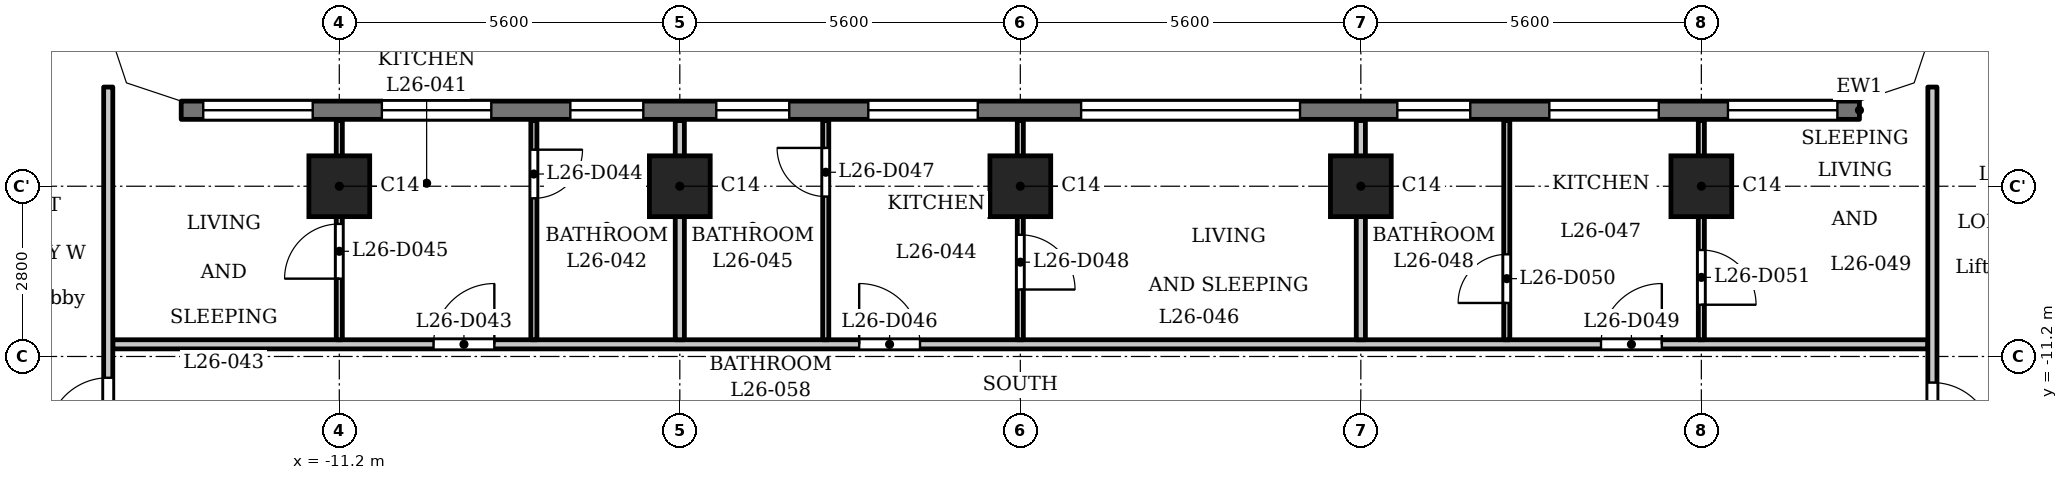
"""IFC4 building model, lengths in metres.
Left out: names, types, materials, properties, quantities, classifications, styles, units other than length and angle.
Written with IfcOpenShell. Run it as: python <this file> out.ifc"""

import sys

from ifc_helpers import new_model, si_unit, direction, frame, frame_2d, origin, origin_2d, place, context, subcontext, project, spatial, polyline, rectangle, outline, extrude, element, fill, save


model = new_model("IFC4")
c1 = context("Model", 3, precision=1e-05, world=origin(), true_north=direction((0.0, 1.0)))
c2 = subcontext(c1, "Body", "Model", "MODEL_VIEW")
j1 = project(units=[si_unit("LENGTHUNIT", "METRE"), si_unit("PLANEANGLEUNIT", "RADIAN")], contexts=[c1])
p1 = place(None, origin())
s1 = spatial("IfcSite", under=j1, at=p1, CompositionType="ELEMENT")
p2 = place(p1, origin())
s2 = spatial("IfcBuilding", under=s1, at=p2, CompositionType="ELEMENT")
p3 = place(p2, frame((0.0, 0.0, 104.3)))
s3 = spatial("IfcBuildingStorey", under=s2, at=p3, CompositionType="ELEMENT", Elevation=104.3)
for number, where, z_axis, x_axis in (
    (1, (-11.2, -8.4, 0.0), (0.0, 0.0, 1.0), (1.0, 0.0, 0.0)),
    (2, (-5.6, -8.4, 0.0), (0.0, 0.0, 1.0), (1.0, 0.0, 0.0)),
    (3, (0.0, -8.4, 0.0), (0.0, 0.0, 1.0), (1.0, 0.0, 0.0)),
    (4, (5.6, -8.4, 0.0), (0.0, 0.0, 1.0), (1.0, 0.0, 0.0)),
    (5, (11.2, -8.4, 0.0), (0.0, 0.0, 1.0), (1.0, 0.0, 0.0)),
):
    element("IfcColumn", number, at=place(p3, frame(where, z_axis=z_axis, x_axis=x_axis)), inside=s3, PredefinedType="COLUMN", context=c2, shape_type="SweptSolid", body=[
        extrude(rectangle(XDim=1.0, YDim=1.0, at=origin_2d()), origin(), (0.0, 0.0, 1.0), 3.5),
    ])
p4 = place(p3, frame((13.8, -7.15, 0.0), z_axis=(0.0, 0.0, 1.0), x_axis=(-1.0, 0.0, 0.0)))
e6 = element("IfcWall", 6, at=p4, inside=s3, PredefinedType="SOLIDWALL", context=c2, shape_type="SweptSolid", body=[
    extrude(rectangle(XDim=27.6, YDim=0.3, at=frame_2d((13.8, 0.0))), origin(), (0.0, 0.0, 1.0), 3.2),
])
p5 = place(p4, frame((0.363, 0.0, 0.9)))
e7 = element("IfcOpeningElement", 7, at=p5, cuts=e6, PredefinedType="OPENING", context=c2, shape_type="SweptSolid", body=[
    extrude(rectangle(XDim=1.8, YDim=1.25, at=frame_2d((0.9, 0.625))), frame((0.0, 0.16, 0.0), z_axis=(0.0, -1.0, 0.0), x_axis=(1.0, 0.0, 0.0)), (0.0, 0.0, 1.0), 0.32),
])
p6 = place(p4, frame((3.3, 0.0, 0.9)))
e8 = element("IfcOpeningElement", 8, at=p6, cuts=e6, PredefinedType="OPENING", context=c2, shape_type="SweptSolid", body=[
    extrude(rectangle(XDim=1.8, YDim=1.25, at=frame_2d((0.9, 0.625))), frame((0.0, 0.16, 0.0), z_axis=(0.0, -1.0, 0.0), x_axis=(1.0, 0.0, 0.0)), (0.0, 0.0, 1.0), 0.32),
])
p7 = place(p4, frame((6.4, 0.0, 0.6)))
e9 = element("IfcOpeningElement", 9, at=p7, cuts=e6, PredefinedType="OPENING", context=c2, shape_type="SweptSolid", body=[
    extrude(rectangle(XDim=1.2, YDim=1.55, at=frame_2d((0.6, 0.775))), frame((0.0, 0.16, 0.0), z_axis=(0.0, -1.0, 0.0), x_axis=(1.0, 0.0, 0.0)), (0.0, 0.0, 1.0), 0.32),
])
p8 = place(p4, frame((9.2, 0.0, 1.2)))
e10 = element("IfcOpeningElement", 10, at=p8, cuts=e6, PredefinedType="OPENING", context=c2, shape_type="SweptSolid", body=[
    extrude(rectangle(XDim=3.6, YDim=0.95, at=frame_2d((1.8, 0.475))), frame((0.0, 0.16, 0.0), z_axis=(0.0, -1.0, 0.0), x_axis=(1.0, 0.0, 0.0)), (0.0, 0.0, 1.0), 0.32),
])
p9 = place(p4, frame((14.5, 0.0, 0.9)))
e11 = element("IfcOpeningElement", 11, at=p9, cuts=e6, PredefinedType="OPENING", context=c2, shape_type="SweptSolid", body=[
    extrude(rectangle(XDim=1.8, YDim=1.25, at=frame_2d((0.9, 0.625))), frame((0.0, 0.16, 0.0), z_axis=(0.0, -1.0, 0.0), x_axis=(1.0, 0.0, 0.0)), (0.0, 0.0, 1.0), 0.32),
])
p10 = place(p4, frame((17.6, 0.0, 0.6)))
e12 = element("IfcOpeningElement", 12, at=p10, cuts=e6, PredefinedType="OPENING", context=c2, shape_type="SweptSolid", body=[
    extrude(rectangle(XDim=1.2, YDim=1.55, at=frame_2d((0.6, 0.775))), frame((0.0, 0.16, 0.0), z_axis=(0.0, -1.0, 0.0), x_axis=(1.0, 0.0, 0.0)), (0.0, 0.0, 1.0), 0.32),
])
p11 = place(p4, frame((20.0, 0.0, 0.6)))
e13 = element("IfcOpeningElement", 13, at=p11, cuts=e6, PredefinedType="OPENING", context=c2, shape_type="SweptSolid", body=[
    extrude(rectangle(XDim=1.2, YDim=1.55, at=frame_2d((0.6, 0.775))), frame((0.0, 0.16, 0.0), z_axis=(0.0, -1.0, 0.0), x_axis=(1.0, 0.0, 0.0)), (0.0, 0.0, 1.0), 0.32),
])
p12 = place(p4, frame((22.5, 0.0, 0.9)))
e14 = element("IfcOpeningElement", 14, at=p12, cuts=e6, PredefinedType="OPENING", context=c2, shape_type="SweptSolid", body=[
    extrude(rectangle(XDim=1.8, YDim=1.25, at=frame_2d((0.9, 0.625))), frame((0.0, 0.16, 0.0), z_axis=(0.0, -1.0, 0.0), x_axis=(1.0, 0.0, 0.0)), (0.0, 0.0, 1.0), 0.32),
])
p13 = place(p4, frame((25.438, 0.0, 0.9)))
e15 = element("IfcOpeningElement", 15, at=p13, cuts=e6, PredefinedType="OPENING", context=c2, shape_type="SweptSolid", body=[
    extrude(rectangle(XDim=1.8, YDim=1.25, at=frame_2d((0.9, 0.625))), frame((0.0, 0.16, 0.0), z_axis=(0.0, -1.0, 0.0), x_axis=(1.0, 0.0, 0.0)), (0.0, 0.0, 1.0), 0.32),
])
p14 = place(p3, frame((-14.925, -11.0, 0.0), z_axis=(0.0, 0.0, 1.0), x_axis=(1.0, 0.0, 0.0)))
e16 = element("IfcWall", 16, at=p14, inside=s3, PredefinedType="PARTITIONING", context=c2, shape_type="SweptSolid", body=[
    extrude(rectangle(XDim=29.85, YDim=0.15, at=frame_2d((14.925, 0.0))), origin(), (0.0, 0.0, 1.0), 3.2),
])
p15 = place(p14, frame((5.275, 0.0, 0.0)))
e17 = element("IfcOpeningElement", 17, at=p15, cuts=e16, PredefinedType="OPENING", context=c2, shape_type="SweptSolid", body=[
    extrude(rectangle(XDim=1.0, YDim=2.1, at=frame_2d((0.5, 1.05))), frame((0.0, 0.085, 0.0), z_axis=(0.0, -1.0, 0.0), x_axis=(1.0, 0.0, 0.0)), (0.0, 0.0, 1.0), 0.17),
])
p16 = place(p14, frame((12.275, 0.0, 0.0)))
e18 = element("IfcOpeningElement", 18, at=p16, cuts=e16, PredefinedType="OPENING", context=c2, shape_type="SweptSolid", body=[
    extrude(rectangle(XDim=1.0, YDim=2.1, at=frame_2d((0.5, 1.05))), frame((0.0, 0.085, 0.0), z_axis=(0.0, -1.0, 0.0), x_axis=(1.0, 0.0, 0.0)), (0.0, 0.0, 1.0), 0.17),
])
p17 = place(p14, frame((24.475, 0.0, 0.0)))
e19 = element("IfcOpeningElement", 19, at=p17, cuts=e16, PredefinedType="OPENING", context=c2, shape_type="SweptSolid", body=[
    extrude(rectangle(XDim=1.0, YDim=2.1, at=frame_2d((0.5, 1.05))), frame((0.0, 0.085, 0.0), z_axis=(0.0, -1.0, 0.0), x_axis=(1.0, 0.0, 0.0)), (0.0, 0.0, 1.0), 0.17),
])
p18 = place(p3, frame((-15.0, -13.125, 0.0), z_axis=(0.0, 0.0, 1.0), x_axis=(0.0, 1.0, 0.0)))
e20 = element("IfcWall", 20, at=p18, inside=s3, PredefinedType="PARTITIONING", context=c2, shape_type="SweptSolid", body=[
    extrude(rectangle(XDim=6.356, YDim=0.15, at=frame_2d((3.178, 0.0))), origin(), (0.0, 0.0, 1.0), 3.2),
])
p19 = place(p18, frame((0.575, 0.0, 0.0)))
e21 = element("IfcOpeningElement", 21, at=p19, cuts=e20, PredefinedType="OPENING", context=c2, shape_type="SweptSolid", body=[
    extrude(rectangle(XDim=1.0, YDim=2.1, at=frame_2d((0.5, 1.05))), frame((0.0, 0.085, 0.0), z_axis=(0.0, -1.0, 0.0), x_axis=(1.0, 0.0, 0.0)), (0.0, 0.0, 1.0), 0.17),
])
p20 = place(p3, frame((-11.2, -10.925, 0.0), z_axis=(0.0, 0.0, 1.0), x_axis=(0.0, 1.0, 0.0)))
e22 = element("IfcWall", 22, at=p20, inside=s3, PredefinedType="PARTITIONING", context=c2, shape_type="SweptSolid", body=[
    extrude(rectangle(XDim=3.605, YDim=0.1, at=frame_2d((1.802, 0.0))), origin(), (0.0, 0.0, 1.0), 3.2),
])
p21 = place(p20, frame((1.005, 0.0, 0.0)))
e23 = element("IfcOpeningElement", 23, at=p21, cuts=e22, PredefinedType="OPENING", context=c2, shape_type="SweptSolid", body=[
    extrude(rectangle(XDim=0.9, YDim=2.1, at=frame_2d((0.45, 1.05))), frame((0.0, 0.06, 0.0), z_axis=(0.0, -1.0, 0.0), x_axis=(1.0, 0.0, 0.0)), (0.0, 0.0, 1.0), 0.12),
])
p22 = place(p3, frame((-8.0, -10.925, 0.0), z_axis=(0.0, 0.0, 1.0), x_axis=(0.0, 1.0, 0.0)))
e24 = element("IfcWall", 24, at=p22, inside=s3, PredefinedType="PARTITIONING", context=c2, shape_type="SweptSolid", body=[
    extrude(rectangle(XDim=3.605, YDim=0.1, at=frame_2d((1.802, 0.0))), origin(), (0.0, 0.0, 1.0), 3.2),
])
p23 = place(p22, frame((2.326, 0.0, 0.0)))
e25 = element("IfcOpeningElement", 25, at=p23, cuts=e24, PredefinedType="OPENING", context=c2, shape_type="SweptSolid", body=[
    extrude(rectangle(XDim=0.8, YDim=2.1, at=frame_2d((0.4, 1.05))), frame((0.0, 0.06, 0.0), z_axis=(0.0, -1.0, 0.0), x_axis=(1.0, 0.0, 0.0)), (0.0, 0.0, 1.0), 0.12),
])
p24 = place(p3, frame((-5.6, -10.925, 0.0), z_axis=(0.0, 0.0, 1.0), x_axis=(0.0, 1.0, 0.0)))
e26 = element("IfcWall", 26, at=p24, inside=s3, PredefinedType="PARTITIONING", context=c2, shape_type="SweptSolid", body=[
    extrude(rectangle(XDim=3.605, YDim=0.15, at=frame_2d((1.802, 0.0))), origin(), (0.0, 0.0, 1.0), 3.2),
])
p25 = place(p3, frame((-3.2, -10.925, 0.0), z_axis=(0.0, 0.0, 1.0), x_axis=(0.0, 1.0, 0.0)))
e27 = element("IfcWall", 27, at=p25, inside=s3, PredefinedType="PARTITIONING", context=c2, shape_type="SweptSolid", body=[
    extrude(rectangle(XDim=3.605, YDim=0.1, at=frame_2d((1.802, 0.0))), origin(), (0.0, 0.0, 1.0), 3.2),
])
p26 = place(p25, frame((2.355, 0.0, 0.0)))
e28 = element("IfcOpeningElement", 28, at=p26, cuts=e27, PredefinedType="OPENING", context=c2, shape_type="SweptSolid", body=[
    extrude(rectangle(XDim=0.8, YDim=2.1, at=frame_2d((0.4, 1.05))), frame((0.0, 0.06, 0.0), z_axis=(0.0, -1.0, 0.0), x_axis=(1.0, 0.0, 0.0)), (0.0, 0.0, 1.0), 0.12),
])
p27 = place(p3, frame((0.0, -10.925, 0.0), z_axis=(0.0, 0.0, 1.0), x_axis=(0.0, 1.0, 0.0)))
e29 = element("IfcWall", 29, at=p27, inside=s3, PredefinedType="PARTITIONING", context=c2, shape_type="SweptSolid", body=[
    extrude(rectangle(XDim=3.605, YDim=0.1, at=frame_2d((1.802, 0.0))), origin(), (0.0, 0.0, 1.0), 3.2),
])
p28 = place(p27, frame((0.826, 0.0, 0.0)))
e30 = element("IfcOpeningElement", 30, at=p28, cuts=e29, PredefinedType="OPENING", context=c2, shape_type="SweptSolid", body=[
    extrude(rectangle(XDim=0.9, YDim=2.1, at=frame_2d((0.45, 1.05))), frame((0.0, 0.06, 0.0), z_axis=(0.0, -1.0, 0.0), x_axis=(1.0, 0.0, 0.0)), (0.0, 0.0, 1.0), 0.12),
])
p29 = place(p3, frame((5.6, -10.925, 0.0), z_axis=(0.0, 0.0, 1.0), x_axis=(0.0, 1.0, 0.0)))
e31 = element("IfcWall", 31, at=p29, inside=s3, PredefinedType="PARTITIONING", context=c2, shape_type="SweptSolid", body=[
    extrude(rectangle(XDim=3.605, YDim=0.15, at=frame_2d((1.802, 0.0))), origin(), (0.0, 0.0, 1.0), 3.2),
])
p30 = place(p3, frame((8.0, -10.925, 0.0), z_axis=(0.0, 0.0, 1.0), x_axis=(0.0, 1.0, 0.0)))
e32 = element("IfcWall", 32, at=p30, inside=s3, PredefinedType="PARTITIONING", context=c2, shape_type="SweptSolid", body=[
    extrude(rectangle(XDim=3.605, YDim=0.1, at=frame_2d((1.802, 0.0))), origin(), (0.0, 0.0, 1.0), 3.2),
])
p31 = place(p30, frame((0.605, 0.0, 0.0)))
e33 = element("IfcOpeningElement", 33, at=p31, cuts=e32, PredefinedType="OPENING", context=c2, shape_type="SweptSolid", body=[
    extrude(rectangle(XDim=0.8, YDim=2.1, at=frame_2d((0.4, 1.05))), frame((0.0, 0.06, 0.0), z_axis=(0.0, -1.0, 0.0), x_axis=(1.0, 0.0, 0.0)), (0.0, 0.0, 1.0), 0.12),
])
p32 = place(p3, frame((11.2, -10.925, 0.0), z_axis=(0.0, 0.0, 1.0), x_axis=(0.0, 1.0, 0.0)))
e34 = element("IfcWall", 34, at=p32, inside=s3, PredefinedType="PARTITIONING", context=c2, shape_type="SweptSolid", body=[
    extrude(rectangle(XDim=3.605, YDim=0.1, at=frame_2d((1.802, 0.0))), origin(), (0.0, 0.0, 1.0), 3.2),
])
p33 = place(p32, frame((0.576, 0.0, 0.0)))
e35 = element("IfcOpeningElement", 35, at=p33, cuts=e34, PredefinedType="OPENING", context=c2, shape_type="SweptSolid", body=[
    extrude(rectangle(XDim=0.9, YDim=2.1, at=frame_2d((0.45, 1.05))), frame((0.0, 0.06, 0.0), z_axis=(0.0, -1.0, 0.0), x_axis=(1.0, 0.0, 0.0)), (0.0, 0.0, 1.0), 0.12),
])
p34 = place(p3, frame((15.0, -13.125, 0.0), z_axis=(0.0, 0.0, 1.0), x_axis=(0.0, 1.0, 0.0)))
e36 = element("IfcWall", 36, at=p34, inside=s3, PredefinedType="PARTITIONING", context=c2, shape_type="SweptSolid", body=[
    extrude(rectangle(XDim=6.356, YDim=0.15, at=frame_2d((3.178, 0.0))), origin(), (0.0, 0.0, 1.0), 3.2),
])
p35 = place(p34, frame((0.496, 0.0, 0.0)))
e37 = element("IfcOpeningElement", 37, at=p35, cuts=e36, PredefinedType="OPENING", context=c2, shape_type="SweptSolid", body=[
    extrude(rectangle(XDim=1.0, YDim=2.1, at=frame_2d((0.5, 1.05))), frame((0.0, 0.085, 0.0), z_axis=(0.0, -1.0, 0.0), x_axis=(1.0, 0.0, 0.0)), (0.0, 0.0, 1.0), 0.17),
])
p36 = place(p3, origin())
e38 = element("IfcWall", 38, at=p36, inside=s3, PredefinedType="SOLIDWALL", context=c2, shape_type="SweptSolid", body=[
    extrude(outline(polyline([(14.937, -6.937), (15.3, -5.849), (15.3, -5.8), (15.0, -5.8), (14.7, -6.7), (13.8, -7.0), (13.8, -7.3), (13.849, -7.3), (14.937, -6.937)])), origin(), (0.0, 0.0, 1.0), 3.2),
])
e39 = element("IfcWall", 39, at=p36, inside=s3, PredefinedType="SOLIDWALL", context=c2, shape_type="SweptSolid", body=[
    extrude(outline(polyline([(-14.937, -6.937), (-13.849, -7.3), (-13.8, -7.3), (-13.8, -7.0), (-14.7, -6.7), (-15.0, -5.8), (-15.3, -5.8), (-15.3, -5.849), (-14.937, -6.937)])), origin(), (0.0, 0.0, 1.0), 3.2),
])
p37 = place(p19, origin())
e40 = element("IfcDoor", 40, at=p37, inside=s3, OperationType="SINGLE_SWING_RIGHT", PredefinedType="DOOR", context=c2, shape_type="SweptSolid", body=[
    extrude(rectangle(XDim=1.0, YDim=2.1, at=frame_2d((0.5, 1.05))), frame((0.0, 0.025, 0.0), z_axis=(0.0, -1.0, 0.0), x_axis=(1.0, 0.0, 0.0)), (0.0, 0.0, 1.0), 0.05),
])
fill(e21, e40)
p38 = place(p35, origin())
e41 = element("IfcDoor", 41, at=p38, inside=s3, OperationType="SINGLE_SWING_LEFT", PredefinedType="DOOR", context=c2, shape_type="SweptSolid", body=[
    extrude(rectangle(XDim=1.0, YDim=2.1, at=frame_2d((0.5, 1.05))), frame((0.0, 0.025, 0.0), z_axis=(0.0, -1.0, 0.0), x_axis=(1.0, 0.0, 0.0)), (0.0, 0.0, 1.0), 0.05),
])
fill(e37, e41)
p39 = place(p15, origin())
e42 = element("IfcDoor", 42, at=p39, inside=s3, OperationType="SINGLE_SWING_LEFT", PredefinedType="DOOR", context=c2, shape_type="SweptSolid", body=[
    extrude(rectangle(XDim=1.0, YDim=2.1, at=frame_2d((0.5, 1.05))), frame((0.0, 0.025, 0.0), z_axis=(0.0, -1.0, 0.0), x_axis=(1.0, 0.0, 0.0)), (0.0, 0.0, 1.0), 0.05),
])
fill(e17, e42)
p40 = place(p23, origin())
e43 = element("IfcDoor", 43, at=p40, inside=s3, OperationType="SINGLE_SWING_RIGHT", PredefinedType="DOOR", context=c2, shape_type="SweptSolid", body=[
    extrude(rectangle(XDim=0.8, YDim=2.1, at=frame_2d((0.4, 1.05))), frame((0.0, 0.025, 0.0), z_axis=(0.0, -1.0, 0.0), x_axis=(1.0, 0.0, 0.0)), (0.0, 0.0, 1.0), 0.05),
])
fill(e25, e43)
p41 = place(p21, origin())
e44 = element("IfcDoor", 44, at=p41, inside=s3, OperationType="SINGLE_SWING_RIGHT", PredefinedType="DOOR", context=c2, shape_type="SweptSolid", body=[
    extrude(rectangle(XDim=0.9, YDim=2.1, at=frame_2d((0.45, 1.05))), frame((0.0, 0.025, 0.0), z_axis=(0.0, -1.0, 0.0), x_axis=(1.0, 0.0, 0.0)), (0.0, 0.0, 1.0), 0.05),
])
fill(e23, e44)
p42 = place(p16, origin())
e45 = element("IfcDoor", 45, at=p42, inside=s3, OperationType="SINGLE_SWING_RIGHT", PredefinedType="DOOR", context=c2, shape_type="SweptSolid", body=[
    extrude(rectangle(XDim=1.0, YDim=2.1, at=frame_2d((0.5, 1.05))), frame((0.0, 0.025, 0.0), z_axis=(0.0, -1.0, 0.0), x_axis=(1.0, 0.0, 0.0)), (0.0, 0.0, 1.0), 0.05),
])
fill(e18, e45)
p43 = place(p26, origin())
e46 = element("IfcDoor", 46, at=p43, inside=s3, OperationType="SINGLE_SWING_LEFT", PredefinedType="DOOR", context=c2, shape_type="SweptSolid", body=[
    extrude(rectangle(XDim=0.8, YDim=2.1, at=frame_2d((0.4, 1.05))), frame((0.0, 0.025, 0.0), z_axis=(0.0, -1.0, 0.0), x_axis=(1.0, 0.0, 0.0)), (0.0, 0.0, 1.0), 0.05),
])
fill(e28, e46)
p44 = place(p28, origin())
e47 = element("IfcDoor", 47, at=p44, inside=s3, OperationType="SINGLE_SWING_LEFT", PredefinedType="DOOR", context=c2, shape_type="SweptSolid", body=[
    extrude(rectangle(XDim=0.9, YDim=2.1, at=frame_2d((0.45, 1.05))), frame((0.0, 0.025, 0.0), z_axis=(0.0, -1.0, 0.0), x_axis=(1.0, 0.0, 0.0)), (0.0, 0.0, 1.0), 0.05),
])
fill(e30, e47)
p45 = place(p17, origin())
e48 = element("IfcDoor", 48, at=p45, inside=s3, OperationType="SINGLE_SWING_LEFT", PredefinedType="DOOR", context=c2, shape_type="SweptSolid", body=[
    extrude(rectangle(XDim=1.0, YDim=2.1, at=frame_2d((0.5, 1.05))), frame((0.0, 0.025, 0.0), z_axis=(0.0, -1.0, 0.0), x_axis=(1.0, 0.0, 0.0)), (0.0, 0.0, 1.0), 0.05),
])
fill(e19, e48)
p46 = place(p31, origin())
e49 = element("IfcDoor", 49, at=p46, inside=s3, OperationType="SINGLE_SWING_RIGHT", PredefinedType="DOOR", context=c2, shape_type="SweptSolid", body=[
    extrude(rectangle(XDim=0.8, YDim=2.1, at=frame_2d((0.4, 1.05))), frame((0.0, 0.025, 0.0), z_axis=(0.0, -1.0, 0.0), x_axis=(1.0, 0.0, 0.0)), (0.0, 0.0, 1.0), 0.05),
])
fill(e33, e49)
p47 = place(p33, origin())
e50 = element("IfcDoor", 50, at=p47, inside=s3, OperationType="SINGLE_SWING_LEFT", PredefinedType="DOOR", context=c2, shape_type="SweptSolid", body=[
    extrude(rectangle(XDim=0.9, YDim=2.1, at=frame_2d((0.45, 1.05))), frame((0.0, 0.025, 0.0), z_axis=(0.0, -1.0, 0.0), x_axis=(1.0, 0.0, 0.0)), (0.0, 0.0, 1.0), 0.05),
])
fill(e35, e50)
p48 = place(p5, origin())
e51 = element("IfcWindow", 51, at=p48, inside=s3, PartitioningType="SINGLE_PANEL", PredefinedType="WINDOW", context=c2, shape_type="SweptSolid", body=[
    extrude(rectangle(XDim=1.8, YDim=1.25, at=frame_2d((0.9, 0.625))), frame((0.0, 0.03, 0.0), z_axis=(0.0, -1.0, 0.0), x_axis=(1.0, 0.0, 0.0)), (0.0, 0.0, 1.0), 0.06),
])
fill(e7, e51)
p49 = place(p6, origin())
e52 = element("IfcWindow", 52, at=p49, inside=s3, PartitioningType="SINGLE_PANEL", PredefinedType="WINDOW", context=c2, shape_type="SweptSolid", body=[
    extrude(rectangle(XDim=1.8, YDim=1.25, at=frame_2d((0.9, 0.625))), frame((0.0, 0.03, 0.0), z_axis=(0.0, -1.0, 0.0), x_axis=(1.0, 0.0, 0.0)), (0.0, 0.0, 1.0), 0.06),
])
fill(e8, e52)
p50 = place(p7, origin())
e53 = element("IfcWindow", 53, at=p50, inside=s3, PartitioningType="SINGLE_PANEL", PredefinedType="WINDOW", context=c2, shape_type="SweptSolid", body=[
    extrude(rectangle(XDim=1.2, YDim=1.55, at=frame_2d((0.6, 0.775))), frame((0.0, 0.03, 0.0), z_axis=(0.0, -1.0, 0.0), x_axis=(1.0, 0.0, 0.0)), (0.0, 0.0, 1.0), 0.06),
])
fill(e9, e53)
p51 = place(p8, origin())
e54 = element("IfcWindow", 54, at=p51, inside=s3, PartitioningType="SINGLE_PANEL", PredefinedType="WINDOW", context=c2, shape_type="SweptSolid", body=[
    extrude(rectangle(XDim=3.6, YDim=0.95, at=frame_2d((1.8, 0.475))), frame((0.0, 0.03, 0.0), z_axis=(0.0, -1.0, 0.0), x_axis=(1.0, 0.0, 0.0)), (0.0, 0.0, 1.0), 0.06),
])
fill(e10, e54)
p52 = place(p9, origin())
e55 = element("IfcWindow", 55, at=p52, inside=s3, PartitioningType="SINGLE_PANEL", PredefinedType="WINDOW", context=c2, shape_type="SweptSolid", body=[
    extrude(rectangle(XDim=1.8, YDim=1.25, at=frame_2d((0.9, 0.625))), frame((0.0, 0.03, 0.0), z_axis=(0.0, -1.0, 0.0), x_axis=(1.0, 0.0, 0.0)), (0.0, 0.0, 1.0), 0.06),
])
fill(e11, e55)
p53 = place(p10, origin())
e56 = element("IfcWindow", 56, at=p53, inside=s3, PartitioningType="SINGLE_PANEL", PredefinedType="WINDOW", context=c2, shape_type="SweptSolid", body=[
    extrude(rectangle(XDim=1.2, YDim=1.55, at=frame_2d((0.6, 0.775))), frame((0.0, 0.03, 0.0), z_axis=(0.0, -1.0, 0.0), x_axis=(1.0, 0.0, 0.0)), (0.0, 0.0, 1.0), 0.06),
])
fill(e12, e56)
p54 = place(p11, origin())
e57 = element("IfcWindow", 57, at=p54, inside=s3, PartitioningType="SINGLE_PANEL", PredefinedType="WINDOW", context=c2, shape_type="SweptSolid", body=[
    extrude(rectangle(XDim=1.2, YDim=1.55, at=frame_2d((0.6, 0.775))), frame((0.0, 0.03, 0.0), z_axis=(0.0, -1.0, 0.0), x_axis=(1.0, 0.0, 0.0)), (0.0, 0.0, 1.0), 0.06),
])
fill(e13, e57)
p55 = place(p12, origin())
e58 = element("IfcWindow", 58, at=p55, inside=s3, PartitioningType="SINGLE_PANEL", PredefinedType="WINDOW", context=c2, shape_type="SweptSolid", body=[
    extrude(rectangle(XDim=1.8, YDim=1.25, at=frame_2d((0.9, 0.625))), frame((0.0, 0.03, 0.0), z_axis=(0.0, -1.0, 0.0), x_axis=(1.0, 0.0, 0.0)), (0.0, 0.0, 1.0), 0.06),
])
fill(e14, e58)
p56 = place(p13, origin())
e59 = element("IfcWindow", 59, at=p56, inside=s3, PartitioningType="SINGLE_PANEL", PredefinedType="WINDOW", context=c2, shape_type="SweptSolid", body=[
    extrude(rectangle(XDim=1.8, YDim=1.25, at=frame_2d((0.9, 0.625))), frame((0.0, 0.03, 0.0), z_axis=(0.0, -1.0, 0.0), x_axis=(1.0, 0.0, 0.0)), (0.0, 0.0, 1.0), 0.06),
])
fill(e15, e59)
save(model, sys.argv[1])
